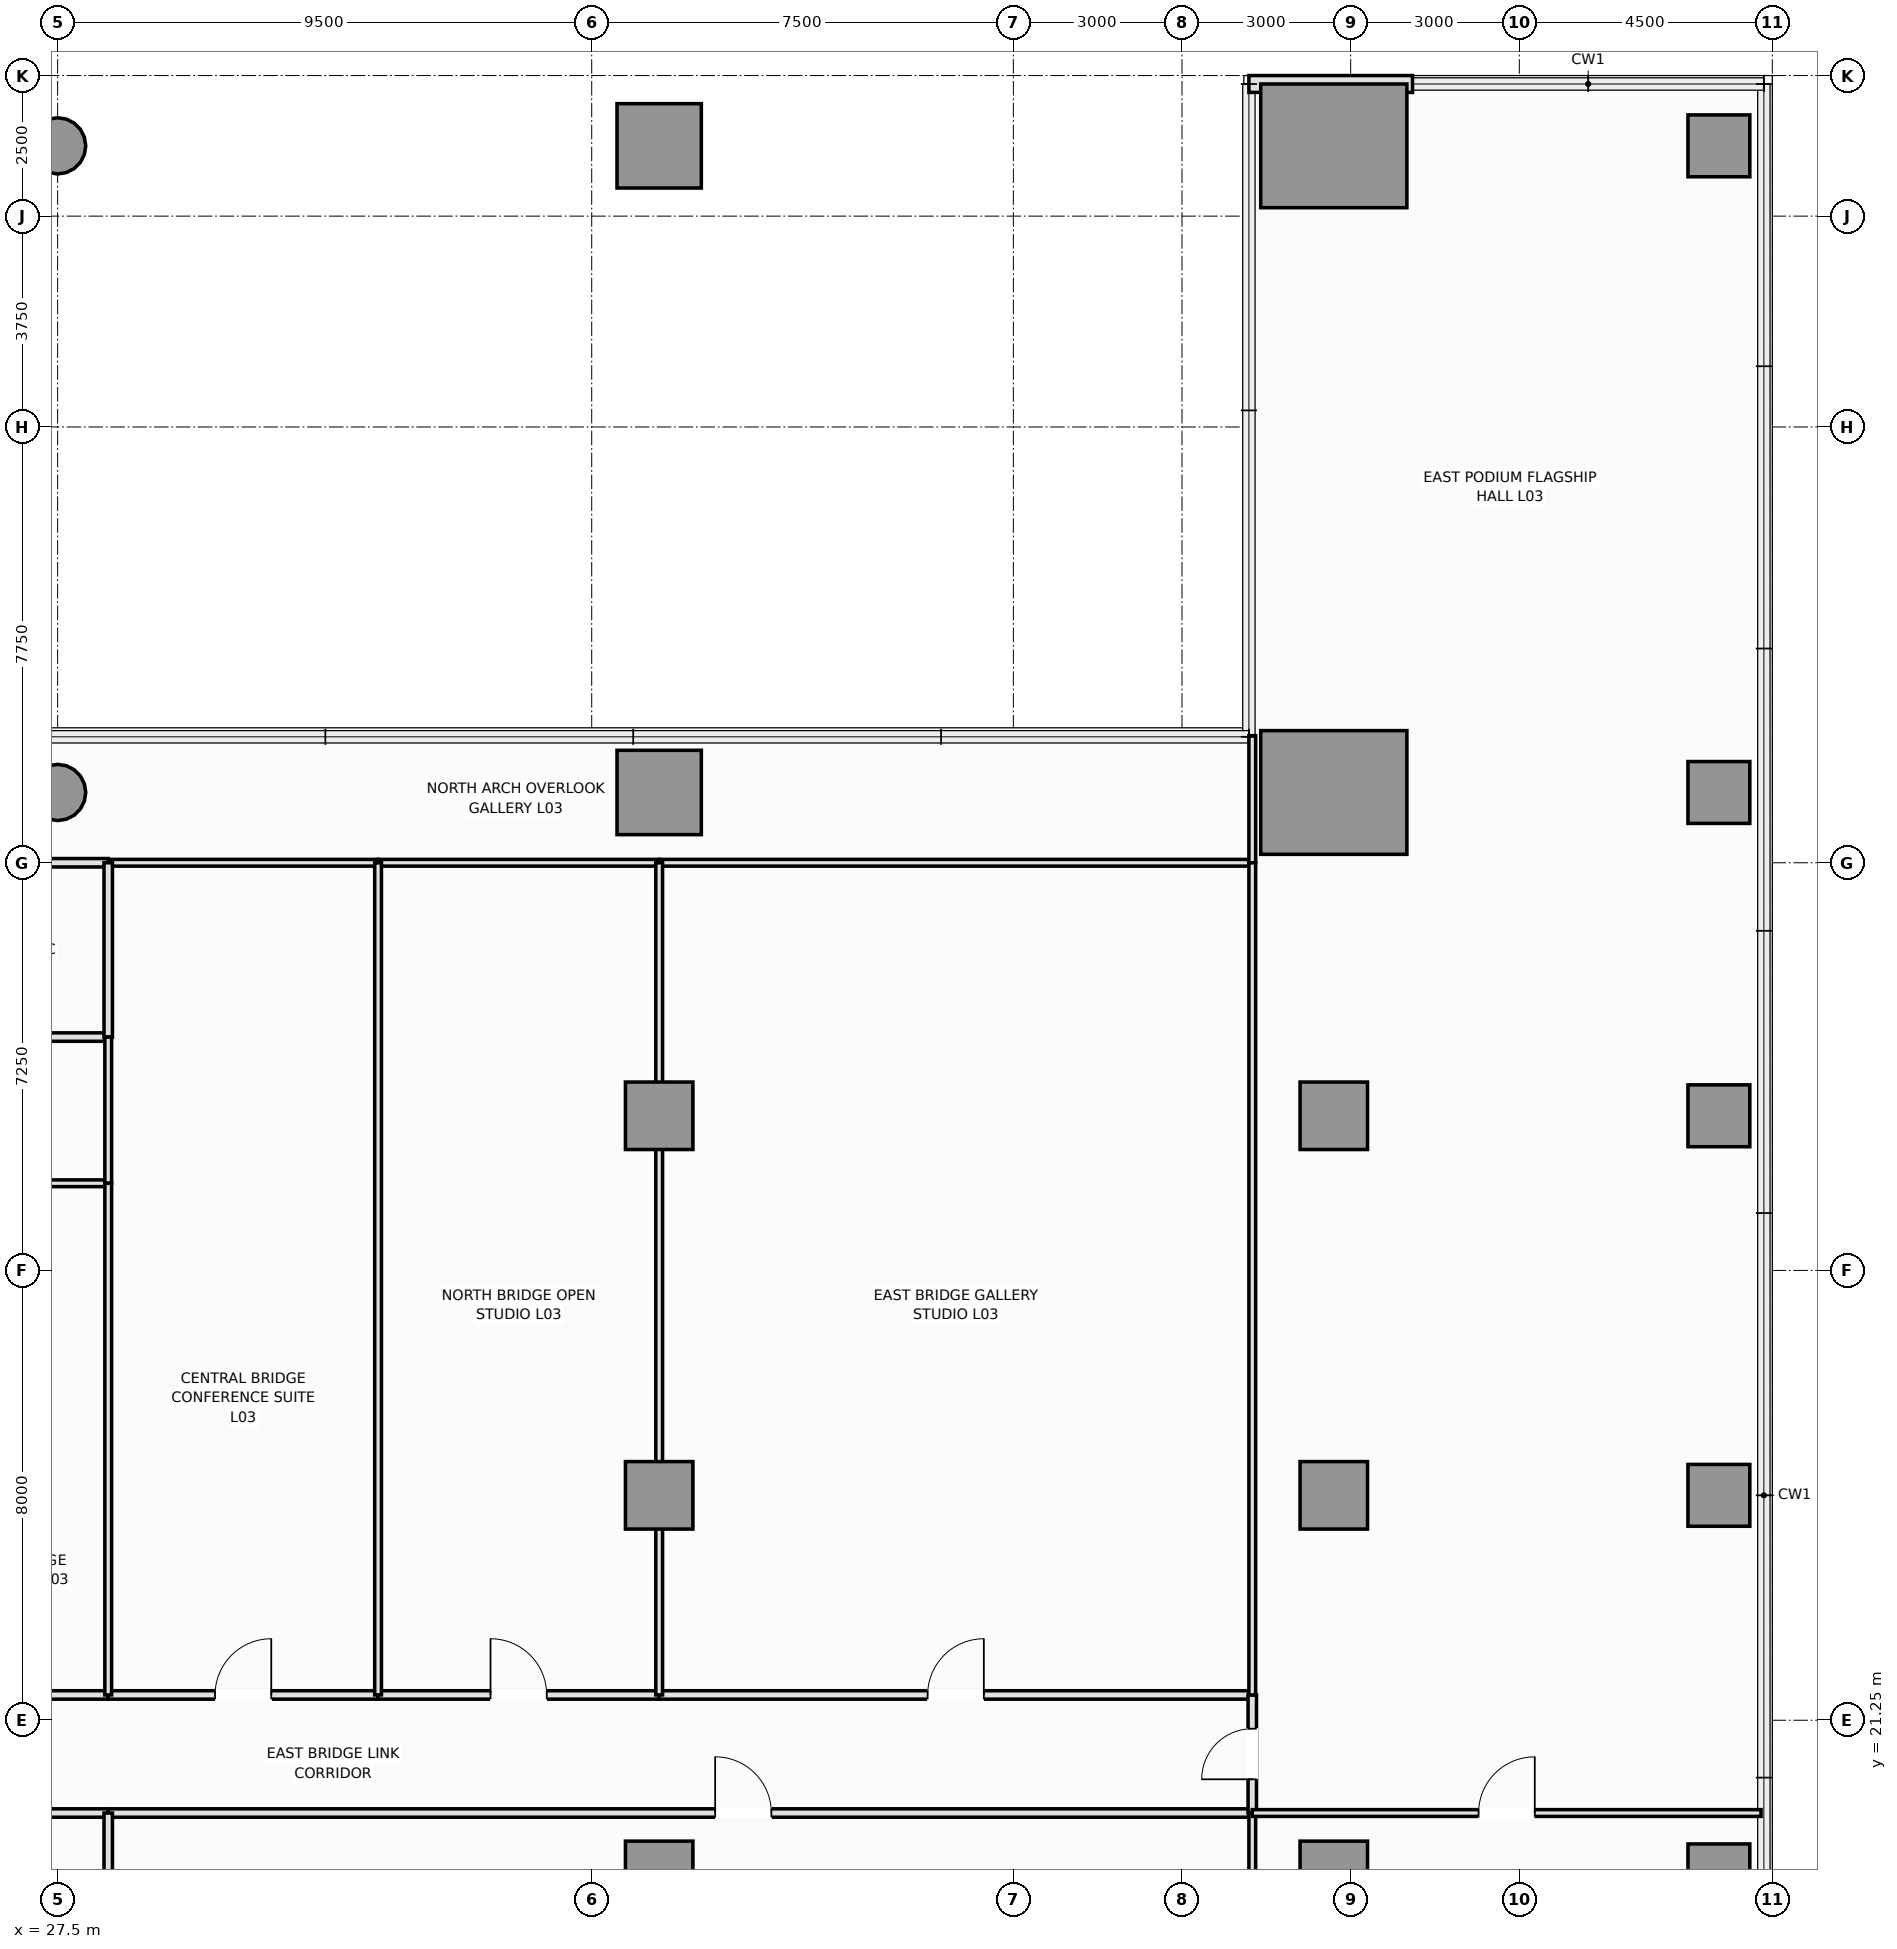
"""IFC4 building model, lengths in metres.
Left out: names, types, materials, properties, quantities, classifications, styles, units other than length and angle.
Written with IfcOpenShell. Run it as: python <this file> out.ifc"""

import sys

from ifc_helpers import new_model, si_unit, direction, frame, frame_2d, origin, origin_2d, place, context, subcontext, project, spatial, rectangle, circle, extrude, element, fill, save


model = new_model("IFC4")
c1 = context("Model", 3, precision=1e-05, world=origin(), true_north=direction((0.0, 1.0)))
c2 = subcontext(c1, "Body", "Model", "MODEL_VIEW")
j1 = project(units=[si_unit("LENGTHUNIT", "METRE"), si_unit("PLANEANGLEUNIT", "RADIAN")], contexts=[c1])
p1 = place(None, origin())
s1 = spatial("IfcSite", under=j1, at=p1, CompositionType="ELEMENT")
p2 = place(p1, origin())
s2 = spatial("IfcBuilding", under=s1, at=p2, CompositionType="ELEMENT")
p3 = place(p2, frame((0.0, 0.0, 15.6)))
s3 = spatial("IfcBuildingStorey", under=s2, at=p3, CompositionType="ELEMENT", Elevation=15.6)
for number, where, z_axis, x_axis in (
    (1, (38.2, 18.5, 0.0), (0.0, 0.0, 1.0), (1.0, 0.0, 0.0)),
    (2, (38.2, 25.25, 0.0), (0.0, 0.0, 1.0), (1.0, 0.0, 0.0)),
    (3, (38.2, 32.0, 0.0), (0.0, 0.0, 1.0), (1.0, 0.0, 0.0)),
):
    element("IfcColumn", number, at=place(p3, frame(where, z_axis=z_axis, x_axis=x_axis)), inside=s3, PredefinedType="COLUMN", context=c2, shape_type="SweptSolid", body=[
        extrude(rectangle(XDim=1.2, YDim=1.2, at=origin_2d()), origin(), (0.0, 0.0, 1.0), 4.8),
    ])
for number, where, z_axis, x_axis in (
    (4, (50.2, 37.75, 0.0), (0.0, 0.0, 1.0), (1.0, 0.0, 0.0)),
    (5, (50.2, 49.25, 0.0), (0.0, 0.0, 1.0), (1.0, 0.0, 0.0)),
):
    element("IfcColumn", number, at=place(p3, frame(where, z_axis=z_axis, x_axis=x_axis)), inside=s3, PredefinedType="COLUMN", context=c2, shape_type="SweptSolid", body=[
        extrude(rectangle(XDim=2.6, YDim=2.2, at=origin_2d()), origin(), (0.0, 0.0, 1.0), 4.8),
    ])
for number, where, z_axis, x_axis in (
    (6, (50.2, 18.5, 0.0), (0.0, 0.0, 1.0), (1.0, 0.0, 0.0)),
    (7, (50.2, 25.25, 0.0), (0.0, 0.0, 1.0), (1.0, 0.0, 0.0)),
    (8, (50.2, 32.0, 0.0), (0.0, 0.0, 1.0), (1.0, 0.0, 0.0)),
):
    element("IfcColumn", number, at=place(p3, frame(where, z_axis=z_axis, x_axis=x_axis)), inside=s3, PredefinedType="COLUMN", context=c2, shape_type="SweptSolid", body=[
        extrude(rectangle(XDim=1.2, YDim=1.2, at=origin_2d()), origin(), (0.0, 0.0, 1.0), 4.8),
    ])
for number, where, z_axis, x_axis in (
    (9, (57.05, 18.5, 0.0), (0.0, 0.0, 1.0), (1.0, 0.0, 0.0)),
    (10, (57.05, 25.25, 0.0), (0.0, 0.0, 1.0), (1.0, 0.0, 0.0)),
    (11, (57.05, 32.0, 0.0), (0.0, 0.0, 1.0), (1.0, 0.0, 0.0)),
    (12, (57.05, 37.75, 0.0), (0.0, 0.0, 1.0), (1.0, 0.0, 0.0)),
    (13, (57.05, 49.25, 0.0), (0.0, 0.0, 1.0), (1.0, 0.0, 0.0)),
):
    element("IfcColumn", number, at=place(p3, frame(where, z_axis=z_axis, x_axis=x_axis)), inside=s3, PredefinedType="COLUMN", context=c2, shape_type="SweptSolid", body=[
        extrude(rectangle(XDim=1.1, YDim=1.1, at=origin_2d()), origin(), (0.0, 0.0, 1.0), 4.8),
    ])
p4 = place(p3, frame((27.5, 37.75, 0.0), z_axis=(0.0, 0.0, 1.0), x_axis=(1.0, 0.0, 0.0)))
e14 = element("IfcColumn", 14, at=p4, inside=s3, PredefinedType="COLUMN", context=c2, shape_type="SweptSolid", body=[
    extrude(circle(Radius=0.5, at=origin_2d()), origin(), (0.0, 0.0, 1.0), 4.8),
])
p5 = place(p3, frame((38.2, 37.75, 0.8), z_axis=(0.0, 0.0, 1.0), x_axis=(1.0, 0.0, 0.0)))
e15 = element("IfcColumn", 15, at=p5, inside=s3, PredefinedType="COLUMN", context=c2, shape_type="SweptSolid", body=[
    extrude(rectangle(XDim=1.5, YDim=1.5, at=origin_2d()), origin(), (0.0, 0.0, 1.0), 4.0),
])
p6 = place(p3, frame((27.5, 49.25, 0.0), z_axis=(0.0, 0.0, 1.0), x_axis=(1.0, 0.0, 0.0)))
e16 = element("IfcColumn", 16, at=p6, inside=s3, PredefinedType="COLUMN", context=c2, shape_type="SweptSolid", body=[
    extrude(circle(Radius=0.5, at=origin_2d()), origin(), (0.0, 0.0, 1.0), 4.8),
])
p7 = place(p3, frame((38.2, 49.25, 0.8), z_axis=(0.0, 0.0, 1.0), x_axis=(1.0, 0.0, 0.0)))
e17 = element("IfcColumn", 17, at=p7, inside=s3, PredefinedType="COLUMN", context=c2, shape_type="SweptSolid", body=[
    extrude(rectangle(XDim=1.5, YDim=1.5, at=origin_2d()), origin(), (0.0, 0.0, 1.0), 4.0),
])
p8 = place(p3, frame((51.6, 50.35, 0.0), z_axis=(0.0, 0.0, 1.0), x_axis=(-1.0, 0.0, 0.0)))
e18 = element("IfcWall", 18, at=p8, inside=s3, PredefinedType="SOLIDWALL", context=c2, shape_type="SweptSolid", body=[
    extrude(rectangle(XDim=2.91, YDim=0.3, at=frame_2d((1.455, 0.0))), origin(), (0.0, 0.0, 1.0), 4.6),
])
p9 = place(p3, frame((24.55, 19.6, 0.0), z_axis=(0.0, 0.0, 1.0), x_axis=(1.0, 0.0, 0.0)))
e19 = element("IfcWall", 19, at=p9, inside=s3, PredefinedType="PLUMBINGWALL", context=c2, shape_type="SweptSolid", body=[
    extrude(rectangle(XDim=3.85, YDim=0.15, at=frame_2d((1.925, 0.0))), origin(), (0.0, 0.0, 1.0), 4.6),
])
p10 = place(p3, frame((28.4, 19.6, 0.0), z_axis=(0.0, 0.0, 1.0), x_axis=(1.0, 0.0, 0.0)))
e20 = element("IfcWall", 20, at=p10, inside=s3, PredefinedType="PARTITIONING", context=c2, shape_type="SweptSolid", body=[
    extrude(rectangle(XDim=20.35, YDim=0.15, at=frame_2d((10.175, 0.0))), origin(), (0.0, 0.0, 1.0), 4.6),
])
p11 = place(p10, frame((10.796, 0.0, 0.0)))
e21 = element("IfcOpeningElement", 21, at=p11, cuts=e20, PredefinedType="OPENING", context=c2, shape_type="SweptSolid", body=[
    extrude(rectangle(XDim=1.0, YDim=2.15, at=frame_2d((0.5, 1.075))), frame((0.0, 0.085, 0.0), z_axis=(0.0, -1.0, 0.0), x_axis=(1.0, 0.0, 0.0)), (0.0, 0.0, 1.0), 0.17),
])
p12 = place(p3, frame((24.55, 21.7, 0.0), z_axis=(0.0, 0.0, 1.0), x_axis=(1.0, 0.0, 0.0)))
e22 = element("IfcWall", 22, at=p12, inside=s3, PredefinedType="PARTITIONING", context=c2, shape_type="SweptSolid", body=[
    extrude(rectangle(XDim=3.85, YDim=0.15, at=frame_2d((1.925, 0.0))), origin(), (0.0, 0.0, 1.0), 4.6),
])
p13 = place(p3, frame((28.4, 21.7, 0.0), z_axis=(0.0, 0.0, 1.0), x_axis=(1.0, 0.0, 0.0)))
e23 = element("IfcWall", 23, at=p13, inside=s3, PredefinedType="PARTITIONING", context=c2, shape_type="SweptSolid", body=[
    extrude(rectangle(XDim=4.8, YDim=0.15, at=frame_2d((2.4, 0.0))), origin(), (0.0, 0.0, 1.0), 4.6),
])
p14 = place(p13, frame((1.9, 0.0, 0.0)))
e24 = element("IfcOpeningElement", 24, at=p14, cuts=e23, PredefinedType="OPENING", context=c2, shape_type="SweptSolid", body=[
    extrude(rectangle(XDim=1.0, YDim=2.15, at=frame_2d((0.5, 1.075))), frame((0.0, 0.085, 0.0), z_axis=(0.0, -1.0, 0.0), x_axis=(1.0, 0.0, 0.0)), (0.0, 0.0, 1.0), 0.17),
])
p15 = place(p3, frame((33.2, 21.7, 0.0), z_axis=(0.0, 0.0, 1.0), x_axis=(1.0, 0.0, 0.0)))
e25 = element("IfcWall", 25, at=p15, inside=s3, PredefinedType="PARTITIONING", context=c2, shape_type="SweptSolid", body=[
    extrude(rectangle(XDim=5.0, YDim=0.15, at=frame_2d((2.5, 0.0))), origin(), (0.0, 0.0, 1.0), 4.6),
])
p16 = place(p15, frame((2.0, 0.0, 0.0)))
e26 = element("IfcOpeningElement", 26, at=p16, cuts=e25, PredefinedType="OPENING", context=c2, shape_type="SweptSolid", body=[
    extrude(rectangle(XDim=1.0, YDim=2.15, at=frame_2d((0.5, 1.075))), frame((0.0, 0.085, 0.0), z_axis=(0.0, -1.0, 0.0), x_axis=(1.0, 0.0, 0.0)), (0.0, 0.0, 1.0), 0.17),
])
p17 = place(p3, frame((38.2, 21.7, 0.0), z_axis=(0.0, 0.0, 1.0), x_axis=(1.0, 0.0, 0.0)))
e27 = element("IfcWall", 27, at=p17, inside=s3, PredefinedType="PARTITIONING", context=c2, shape_type="SweptSolid", body=[
    extrude(rectangle(XDim=10.55, YDim=0.15, at=frame_2d((5.275, 0.0))), origin(), (0.0, 0.0, 1.0), 4.6),
])
p18 = place(p17, frame((4.775, 0.0, 0.0)))
e28 = element("IfcOpeningElement", 28, at=p18, cuts=e27, PredefinedType="OPENING", context=c2, shape_type="SweptSolid", body=[
    extrude(rectangle(XDim=1.0, YDim=2.15, at=frame_2d((0.5, 1.075))), frame((0.0, 0.085, 0.0), z_axis=(0.0, -1.0, 0.0), x_axis=(1.0, 0.0, 0.0)), (0.0, 0.0, 1.0), 0.17),
])
p19 = place(p3, frame((48.75, 19.6, 0.0), z_axis=(0.0, 0.0, 1.0), x_axis=(0.0, 1.0, 0.0)))
e29 = element("IfcWall", 29, at=p19, inside=s3, PredefinedType="PARTITIONING", context=c2, shape_type="SweptSolid", body=[
    extrude(rectangle(XDim=2.1, YDim=0.15, at=frame_2d((1.05, 0.0))), origin(), (0.0, 0.0, 1.0), 4.6),
])
p20 = place(p19, frame((0.6, 0.0, 0.0)))
e30 = element("IfcOpeningElement", 30, at=p20, cuts=e29, PredefinedType="OPENING", context=c2, shape_type="SweptSolid", body=[
    extrude(rectangle(XDim=0.9, YDim=2.1, at=frame_2d((0.45, 1.05))), frame((0.0, 0.085, 0.0), z_axis=(0.0, -1.0, 0.0), x_axis=(1.0, 0.0, 0.0)), (0.0, 0.0, 1.0), 0.17),
])
p21 = place(p3, frame((24.55, 36.5, 0.0), z_axis=(0.0, 0.0, 1.0), x_axis=(1.0, 0.0, 0.0)))
e31 = element("IfcWall", 31, at=p21, inside=s3, PredefinedType="PLUMBINGWALL", context=c2, shape_type="SweptSolid", body=[
    extrude(rectangle(XDim=3.85, YDim=0.15, at=frame_2d((1.925, 0.0))), origin(), (0.0, 0.0, 1.0), 4.6),
])
p22 = place(p3, frame((28.4, 36.5, 0.0), z_axis=(0.0, 0.0, 1.0), x_axis=(1.0, 0.0, 0.0)))
e32 = element("IfcWall", 32, at=p22, inside=s3, PredefinedType="PARTITIONING", context=c2, shape_type="SweptSolid", body=[
    extrude(rectangle(XDim=4.8, YDim=0.12, at=frame_2d((2.4, 0.0))), origin(), (0.0, 0.0, 1.0), 4.6),
])
p23 = place(p3, frame((33.2, 36.5, 0.0), z_axis=(0.0, 0.0, 1.0), x_axis=(1.0, 0.0, 0.0)))
e33 = element("IfcWall", 33, at=p23, inside=s3, PredefinedType="PARTITIONING", context=c2, shape_type="SweptSolid", body=[
    extrude(rectangle(XDim=5.0, YDim=0.12, at=frame_2d((2.5, 0.0))), origin(), (0.0, 0.0, 1.0), 4.6),
])
p24 = place(p3, frame((38.2, 36.5, 0.0), z_axis=(0.0, 0.0, 1.0), x_axis=(1.0, 0.0, 0.0)))
e34 = element("IfcWall", 34, at=p24, inside=s3, PredefinedType="PARTITIONING", context=c2, shape_type="SweptSolid", body=[
    extrude(rectangle(XDim=10.55, YDim=0.12, at=frame_2d((5.275, 0.0))), origin(), (0.0, 0.0, 1.0), 4.6),
])
p25 = place(p3, frame((48.75, 36.5, 0.0), z_axis=(0.0, 0.0, 1.0), x_axis=(0.0, 1.0, 0.0)))
e35 = element("IfcWall", 35, at=p25, inside=s3, PredefinedType="PARTITIONING", context=c2, shape_type="SweptSolid", body=[
    extrude(rectangle(XDim=2.26, YDim=0.12, at=frame_2d((1.13, 0.0))), origin(), (0.0, 0.0, 1.0), 4.6),
])
p26 = place(p3, frame((24.55, 33.4, 0.0), z_axis=(0.0, 0.0, 1.0), x_axis=(1.0, 0.0, 0.0)))
e36 = element("IfcWall", 36, at=p26, inside=s3, PredefinedType="PLUMBINGWALL", context=c2, shape_type="SweptSolid", body=[
    extrude(rectangle(XDim=3.85, YDim=0.15, at=frame_2d((1.925, 0.0))), origin(), (0.0, 0.0, 1.0), 4.6),
])
p27 = place(p3, frame((28.4, 33.4, 0.0), z_axis=(0.0, 0.0, 1.0), x_axis=(0.0, 1.0, 0.0)))
e37 = element("IfcWall", 37, at=p27, inside=s3, PredefinedType="PLUMBINGWALL", context=c2, shape_type="SweptSolid", body=[
    extrude(rectangle(XDim=3.1, YDim=0.15, at=frame_2d((1.55, 0.0))), origin(), (0.0, 0.0, 1.0), 4.6),
])
p28 = place(p3, frame((28.4, 16.8, 0.0), z_axis=(0.0, 0.0, 1.0), x_axis=(0.0, 1.0, 0.0)))
e38 = element("IfcWall", 38, at=p28, inside=s3, PredefinedType="PLUMBINGWALL", context=c2, shape_type="SweptSolid", body=[
    extrude(rectangle(XDim=2.8, YDim=0.15, at=frame_2d((1.4, 0.0))), origin(), (0.0, 0.0, 1.0), 4.6),
])
p29 = place(p3, frame((24.55, 30.8, 0.0), z_axis=(0.0, 0.0, 1.0), x_axis=(1.0, 0.0, 0.0)))
e39 = element("IfcWall", 39, at=p29, inside=s3, PredefinedType="PARTITIONING", context=c2, shape_type="SweptSolid", body=[
    extrude(rectangle(XDim=3.85, YDim=0.12, at=frame_2d((1.925, 0.0))), origin(), (0.0, 0.0, 1.0), 4.6),
])
p30 = place(p3, frame((28.4, 30.8, 0.0), z_axis=(0.0, 0.0, 1.0), x_axis=(0.0, 1.0, 0.0)))
e40 = element("IfcWall", 40, at=p30, inside=s3, PredefinedType="PARTITIONING", context=c2, shape_type="SweptSolid", body=[
    extrude(rectangle(XDim=2.6, YDim=0.12, at=frame_2d((1.3, 0.0))), origin(), (0.0, 0.0, 1.0), 4.6),
])
p31 = place(p3, frame((48.75, 14.0, 0.0), z_axis=(0.0, 0.0, 1.0), x_axis=(0.0, 1.0, 0.0)))
e41 = element("IfcWall", 41, at=p31, inside=s3, PredefinedType="PARTITIONING", context=c2, shape_type="SweptSolid", body=[
    extrude(rectangle(XDim=5.6, YDim=0.12, at=frame_2d((2.8, 0.0))), origin(), (0.0, 0.0, 1.0), 4.6),
])
p32 = place(p3, frame((28.4, 21.7, 0.0), z_axis=(0.0, 0.0, 1.0), x_axis=(0.0, 1.0, 0.0)))
e42 = element("IfcWall", 42, at=p32, inside=s3, PredefinedType="PARTITIONING", context=c2, shape_type="SweptSolid", body=[
    extrude(rectangle(XDim=9.1, YDim=0.12, at=frame_2d((4.55, 0.0))), origin(), (0.0, 0.0, 1.0), 4.6),
])
p33 = place(p3, frame((33.2, 21.7, 0.0), z_axis=(0.0, 0.0, 1.0), x_axis=(0.0, 1.0, 0.0)))
e43 = element("IfcWall", 43, at=p33, inside=s3, PredefinedType="PARTITIONING", context=c2, shape_type="SweptSolid", body=[
    extrude(rectangle(XDim=14.8, YDim=0.12, at=frame_2d((7.4, 0.0))), origin(), (0.0, 0.0, 1.0), 4.6),
])
p34 = place(p3, frame((38.2, 21.7, 0.0), z_axis=(0.0, 0.0, 1.0), x_axis=(0.0, 1.0, 0.0)))
e44 = element("IfcWall", 44, at=p34, inside=s3, PredefinedType="PARTITIONING", context=c2, shape_type="SweptSolid", body=[
    extrude(rectangle(XDim=14.8, YDim=0.12, at=frame_2d((7.4, 0.0))), origin(), (0.0, 0.0, 1.0), 4.0),
])
p35 = place(p3, frame((48.75, 21.7, 0.0), z_axis=(0.0, 0.0, 1.0), x_axis=(0.0, 1.0, 0.0)))
e45 = element("IfcWall", 45, at=p35, inside=s3, PredefinedType="PARTITIONING", context=c2, shape_type="SweptSolid", body=[
    extrude(rectangle(XDim=14.8, YDim=0.12, at=frame_2d((7.4, 0.0))), origin(), (0.0, 0.0, 1.0), 4.6),
])
p36 = place(p3, frame((48.75, 19.6, 0.0), z_axis=(0.0, 0.0, 1.0), x_axis=(1.0, 0.0, 0.0)))
e46 = element("IfcWall", 46, at=p36, inside=s3, PredefinedType="PARTITIONING", context=c2, shape_type="SweptSolid", body=[
    extrude(rectangle(XDim=9.05, YDim=0.12, at=frame_2d((4.525, 0.0))), origin(), (0.0, 0.0, 1.0), 4.6),
])
p37 = place(p36, frame((4.025, 0.0, 0.0)))
e47 = element("IfcOpeningElement", 47, at=p37, cuts=e46, PredefinedType="OPENING", context=c2, shape_type="SweptSolid", body=[
    extrude(rectangle(XDim=1.0, YDim=2.15, at=frame_2d((0.5, 1.075))), frame((0.0, 0.07, 0.0), z_axis=(0.0, -1.0, 0.0), x_axis=(1.0, 0.0, 0.0)), (0.0, 0.0, 1.0), 0.14),
])
p38 = place(p11, origin())
e48 = element("IfcDoor", 48, at=p38, inside=s3, OperationType="SINGLE_SWING_LEFT", PredefinedType="DOOR", context=c2, shape_type="SweptSolid", body=[
    extrude(rectangle(XDim=1.0, YDim=2.15, at=frame_2d((0.5, 1.075))), frame((0.0, 0.025, 0.0), z_axis=(0.0, -1.0, 0.0), x_axis=(1.0, 0.0, 0.0)), (0.0, 0.0, 1.0), 0.05),
])
fill(e21, e48)
p39 = place(p14, origin())
e49 = element("IfcDoor", 49, at=p39, inside=s3, OperationType="SINGLE_SWING_RIGHT", PredefinedType="DOOR", context=c2, shape_type="SweptSolid", body=[
    extrude(rectangle(XDim=1.0, YDim=2.15, at=frame_2d((0.5, 1.075))), frame((0.0, 0.025, 0.0), z_axis=(0.0, -1.0, 0.0), x_axis=(1.0, 0.0, 0.0)), (0.0, 0.0, 1.0), 0.05),
])
fill(e24, e49)
p40 = place(p16, origin())
e50 = element("IfcDoor", 50, at=p40, inside=s3, OperationType="SINGLE_SWING_LEFT", PredefinedType="DOOR", context=c2, shape_type="SweptSolid", body=[
    extrude(rectangle(XDim=1.0, YDim=2.15, at=frame_2d((0.5, 1.075))), frame((0.0, 0.025, 0.0), z_axis=(0.0, -1.0, 0.0), x_axis=(1.0, 0.0, 0.0)), (0.0, 0.0, 1.0), 0.05),
])
fill(e26, e50)
p41 = place(p18, origin())
e51 = element("IfcDoor", 51, at=p41, inside=s3, OperationType="SINGLE_SWING_RIGHT", PredefinedType="DOOR", context=c2, shape_type="SweptSolid", body=[
    extrude(rectangle(XDim=1.0, YDim=2.15, at=frame_2d((0.5, 1.075))), frame((0.0, 0.025, 0.0), z_axis=(0.0, -1.0, 0.0), x_axis=(1.0, 0.0, 0.0)), (0.0, 0.0, 1.0), 0.05),
])
fill(e28, e51)
p42 = place(p20, origin())
e52 = element("IfcDoor", 52, at=p42, inside=s3, OperationType="SINGLE_SWING_LEFT", PredefinedType="DOOR", context=c2, shape_type="SweptSolid", body=[
    extrude(rectangle(XDim=0.9, YDim=2.1, at=frame_2d((0.45, 1.05))), frame((0.0, 0.025, 0.0), z_axis=(0.0, -1.0, 0.0), x_axis=(1.0, 0.0, 0.0)), (0.0, 0.0, 1.0), 0.05),
])
fill(e30, e52)
p43 = place(p37, origin())
e53 = element("IfcDoor", 53, at=p43, inside=s3, OperationType="SINGLE_SWING_RIGHT", PredefinedType="DOOR", context=c2, shape_type="SweptSolid", body=[
    extrude(rectangle(XDim=1.0, YDim=2.15, at=frame_2d((0.5, 1.075))), frame((0.0, 0.025, 0.0), z_axis=(0.0, -1.0, 0.0), x_axis=(1.0, 0.0, 0.0)), (0.0, 0.0, 1.0), 0.05),
])
fill(e47, e53)
save(model, sys.argv[1])
